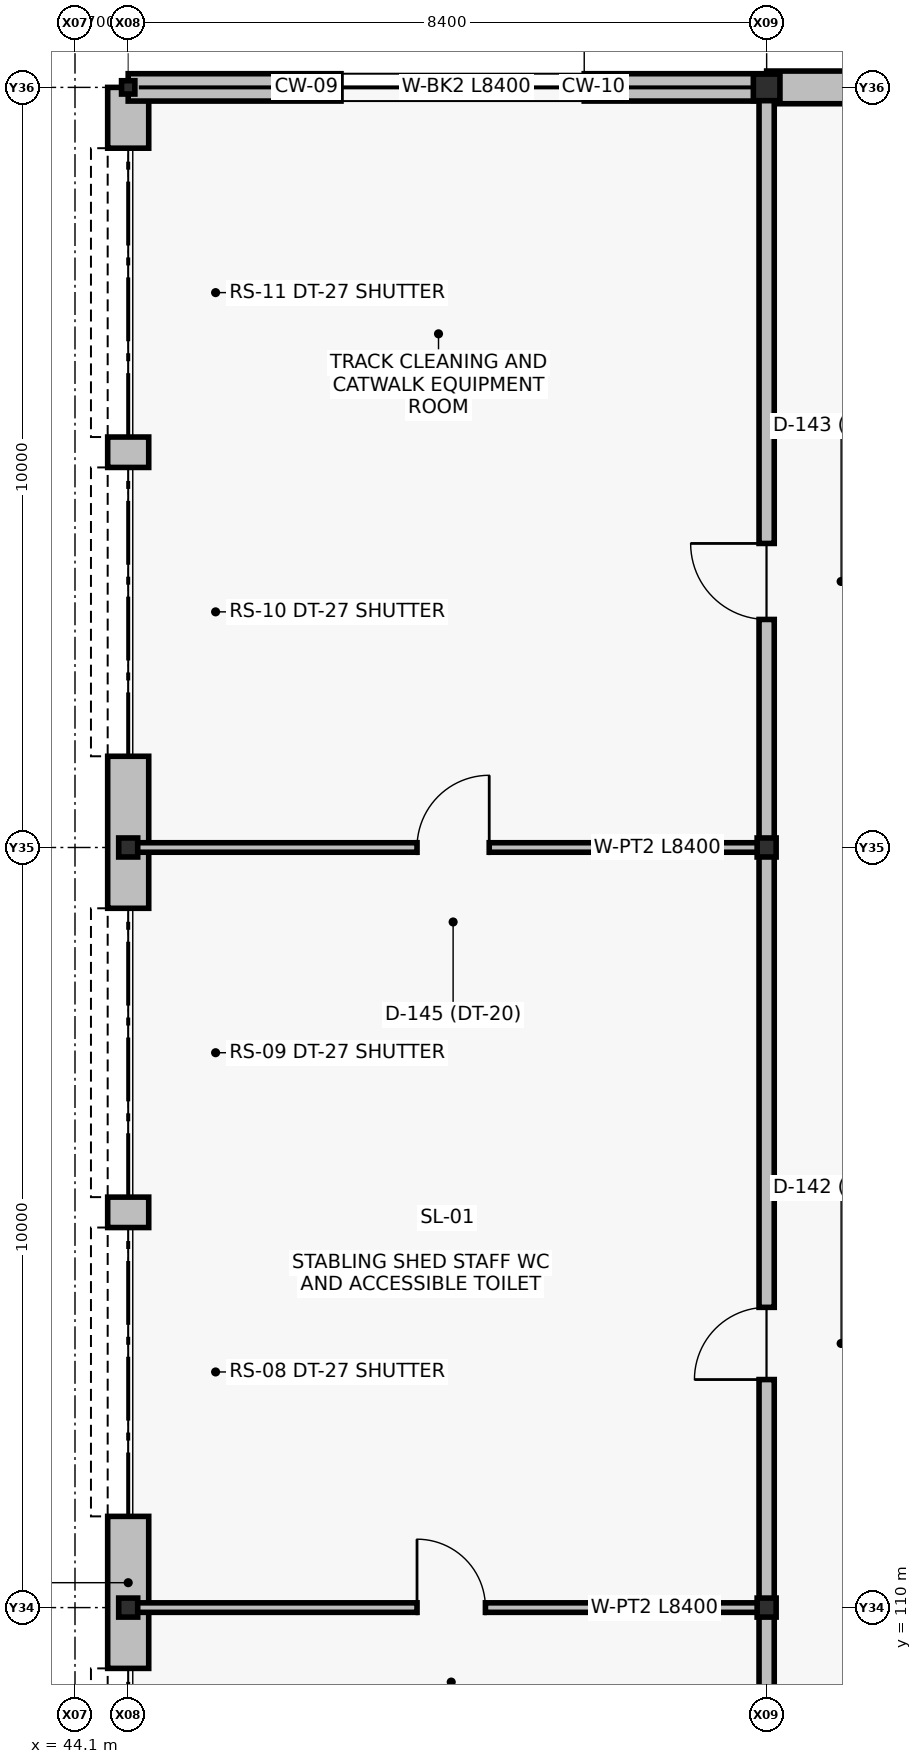
"""IFC4 building model, lengths in metres.
Left out: names, types, materials, properties, quantities, classifications, styles, units other than length and angle.
Written with IfcOpenShell. Run it as: python <this file> out.ifc"""

import sys

from ifc_helpers import new_model, si_unit, direction, frame, frame_2d, origin, origin_2d, place, context, subcontext, project, spatial, rectangle, i_section, extrude, element, fill, save


model = new_model("IFC4")
c1 = context("Model", 3, precision=1e-05, world=origin(), true_north=direction((0.0, 1.0)))
c2 = subcontext(c1, "Body", "Model", "MODEL_VIEW")
j1 = project(units=[si_unit("LENGTHUNIT", "METRE"), si_unit("PLANEANGLEUNIT", "RADIAN")], contexts=[c1])
p1 = place(None, origin())
s1 = spatial("IfcSite", under=j1, at=p1, CompositionType="ELEMENT")
p2 = place(p1, origin())
s2 = spatial("IfcBuilding", under=s1, at=p2, CompositionType="ELEMENT")
p3 = place(p2, origin())
s3 = spatial("IfcBuildingStorey", under=s2, at=p3, CompositionType="ELEMENT", Elevation=0.0)
p4 = place(p3, frame((44.8, 130.0, -0.35), z_axis=(0.0, 0.0, 1.0), x_axis=(1.0, 0.0, 0.0)))
e1 = element("IfcColumn", 1, at=p4, inside=s3, PredefinedType="COLUMN", context=c2, shape_type="SweptSolid", body=[
    extrude(i_section(OverallWidth=0.175, OverallDepth=0.175, WebThickness=0.007, FlangeThickness=0.011, at=origin_2d()), origin(), (0.0, 0.0, 1.0), 6.35),
])
p5 = place(p3, frame((53.2, 130.0, -0.35), z_axis=(0.0, 0.0, 1.0), x_axis=(1.0, 0.0, 0.0)))
e2 = element("IfcColumn", 2, at=p5, inside=s3, PredefinedType="COLUMN", context=c2, shape_type="SweptSolid", body=[
    extrude(i_section(OverallWidth=0.35, OverallDepth=0.35, WebThickness=0.012, FlangeThickness=0.019, at=origin_2d()), origin(), (0.0, 0.0, 1.0), 6.35),
])
for number, where, z_axis, x_axis in (
    (3, (44.8, 110.0, -0.35), (0.0, 0.0, 1.0), (1.0, 0.0, 0.0)),
    (4, (53.2, 110.0, -0.35), (0.0, 0.0, 1.0), (1.0, 0.0, 0.0)),
    (5, (44.8, 120.0, -0.35), (0.0, 0.0, 1.0), (1.0, 0.0, 0.0)),
    (6, (53.2, 120.0, -0.35), (0.0, 0.0, 1.0), (1.0, 0.0, 0.0)),
):
    element("IfcColumn", number, at=place(p3, frame(where, z_axis=z_axis, x_axis=x_axis)), inside=s3, PredefinedType="COLUMN", context=c2, shape_type="SweptSolid", body=[
        extrude(i_section(OverallWidth=0.25, OverallDepth=0.25, WebThickness=0.009, FlangeThickness=0.014, at=origin_2d()), origin(), (0.0, 0.0, 1.0), 6.35),
    ])
p6 = place(p3, frame((44.8, 100.0, 0.0), z_axis=(0.0, 0.0, 1.0), x_axis=(0.0, 1.0, 0.0)))
e7 = element("IfcWall", 7, at=p6, inside=s3, PredefinedType="SOLIDWALL", context=c2, shape_type="SweptSolid", body=[
    extrude(rectangle(XDim=30.0, YDim=0.54, at=frame_2d((15.0, 0.0))), origin(), (0.0, 0.0, 1.0), 5.14),
])
p7 = place(p6, frame((1.2, 0.0, 0.0)))
e8 = element("IfcOpeningElement", 8, at=p7, cuts=e7, PredefinedType="OPENING", context=c2, shape_type="SweptSolid", body=[
    extrude(rectangle(XDim=3.8, YDim=4.4, at=frame_2d((1.9, 2.2))), frame((0.0, 0.28, 0.0), z_axis=(0.0, -1.0, 0.0), x_axis=(1.0, 0.0, 0.0)), (0.0, 0.0, 1.0), 0.56),
])
p8 = place(p6, frame((5.4, 0.0, 0.0)))
e9 = element("IfcOpeningElement", 9, at=p8, cuts=e7, PredefinedType="OPENING", context=c2, shape_type="SweptSolid", body=[
    extrude(rectangle(XDim=3.8, YDim=4.4, at=frame_2d((1.9, 2.2))), frame((0.0, 0.28, 0.0), z_axis=(0.0, -1.0, 0.0), x_axis=(1.0, 0.0, 0.0)), (0.0, 0.0, 1.0), 0.56),
])
p9 = place(p6, frame((11.2, 0.0, 0.0)))
e10 = element("IfcOpeningElement", 10, at=p9, cuts=e7, PredefinedType="OPENING", context=c2, shape_type="SweptSolid", body=[
    extrude(rectangle(XDim=3.8, YDim=4.4, at=frame_2d((1.9, 2.2))), frame((0.0, 0.28, 0.0), z_axis=(0.0, -1.0, 0.0), x_axis=(1.0, 0.0, 0.0)), (0.0, 0.0, 1.0), 0.56),
])
p10 = place(p6, frame((15.4, 0.0, 0.0)))
e11 = element("IfcOpeningElement", 11, at=p10, cuts=e7, PredefinedType="OPENING", context=c2, shape_type="SweptSolid", body=[
    extrude(rectangle(XDim=3.8, YDim=4.4, at=frame_2d((1.9, 2.2))), frame((0.0, 0.28, 0.0), z_axis=(0.0, -1.0, 0.0), x_axis=(1.0, 0.0, 0.0)), (0.0, 0.0, 1.0), 0.56),
])
p11 = place(p6, frame((21.2, 0.0, 0.0)))
e12 = element("IfcOpeningElement", 12, at=p11, cuts=e7, PredefinedType="OPENING", context=c2, shape_type="SweptSolid", body=[
    extrude(rectangle(XDim=3.8, YDim=4.4, at=frame_2d((1.9, 2.2))), frame((0.0, 0.28, 0.0), z_axis=(0.0, -1.0, 0.0), x_axis=(1.0, 0.0, 0.0)), (0.0, 0.0, 1.0), 0.56),
])
p12 = place(p6, frame((25.4, 0.0, 0.0)))
e13 = element("IfcOpeningElement", 13, at=p12, cuts=e7, PredefinedType="OPENING", context=c2, shape_type="SweptSolid", body=[
    extrude(rectangle(XDim=3.8, YDim=4.4, at=frame_2d((1.9, 2.2))), frame((0.0, 0.28, 0.0), z_axis=(0.0, -1.0, 0.0), x_axis=(1.0, 0.0, 0.0)), (0.0, 0.0, 1.0), 0.56),
])
p13 = place(p3, frame((44.8, 130.0, 0.0), z_axis=(0.0, 0.0, 1.0), x_axis=(1.0, 0.0, 0.0)))
e14 = element("IfcWall", 14, at=p13, inside=s3, PredefinedType="SOLIDWALL", context=c2, shape_type="SweptSolid", body=[
    extrude(rectangle(XDim=8.4, YDim=0.36, at=frame_2d((4.2, 0.0))), origin(), (0.0, 0.0, 1.0), 3.2),
])
p14 = place(p13, frame((2.8, 0.0, 0.9)))
e15 = element("IfcOpeningElement", 15, at=p14, cuts=e14, PredefinedType="OPENING", context=c2, shape_type="SweptSolid", body=[
    extrude(rectangle(XDim=3.2, YDim=2.0, at=frame_2d((1.6, 1.0))), frame((0.0, 0.19, 0.0), z_axis=(0.0, -1.0, 0.0), x_axis=(1.0, 0.0, 0.0)), (0.0, 0.0, 1.0), 0.38),
])
p15 = place(p3, frame((53.2, 130.0, 0.0), z_axis=(0.0, 0.0, 1.0), x_axis=(1.0, 0.0, 0.0)))
e16 = element("IfcWall", 16, at=p15, inside=s3, PredefinedType="SOLIDWALL", context=c2, shape_type="SweptSolid", body=[
    extrude(rectangle(XDim=8.4, YDim=0.43, at=frame_2d((4.2, 0.0))), origin(), (0.0, 0.0, 1.0), 5.14),
])
p16 = place(p3, frame((53.2, 77.0, 0.0), z_axis=(0.0, 0.0, 1.0), x_axis=(0.0, 1.0, 0.0)))
e17 = element("IfcWall", 17, at=p16, inside=s3, PredefinedType="PARTITIONING", context=c2, shape_type="SweptSolid", body=[
    extrude(rectangle(XDim=53.0, YDim=0.2, at=frame_2d((26.5, 0.0))), origin(), (0.0, 0.0, 1.0), 5.1),
])
p17 = place(p16, frame((7.0, 0.0, 0.0)))
e18 = element("IfcOpeningElement", 18, at=p17, cuts=e17, PredefinedType="OPENING", context=c2, shape_type="SweptSolid", body=[
    extrude(rectangle(XDim=1.4, YDim=2.2, at=frame_2d((0.7, 1.1))), frame((0.0, 0.11, 0.0), z_axis=(0.0, -1.0, 0.0), x_axis=(1.0, 0.0, 0.0)), (0.0, 0.0, 1.0), 0.22),
])
p18 = place(p16, frame((36.0, 0.0, 0.0)))
e19 = element("IfcOpeningElement", 19, at=p18, cuts=e17, PredefinedType="OPENING", context=c2, shape_type="SweptSolid", body=[
    extrude(rectangle(XDim=0.95, YDim=2.1, at=frame_2d((0.475, 1.05))), frame((0.0, 0.11, 0.0), z_axis=(0.0, -1.0, 0.0), x_axis=(1.0, 0.0, 0.0)), (0.0, 0.0, 1.0), 0.22),
])
p19 = place(p16, frame((46.0, 0.0, 0.0)))
e20 = element("IfcOpeningElement", 20, at=p19, cuts=e17, PredefinedType="OPENING", context=c2, shape_type="SweptSolid", body=[
    extrude(rectangle(XDim=1.0, YDim=2.1, at=frame_2d((0.5, 1.05))), frame((0.0, 0.11, 0.0), z_axis=(0.0, -1.0, 0.0), x_axis=(1.0, 0.0, 0.0)), (0.0, 0.0, 1.0), 0.22),
])
p20 = place(p3, frame((44.8, 110.0, 0.0), z_axis=(0.0, 0.0, 1.0), x_axis=(1.0, 0.0, 0.0)))
e21 = element("IfcWall", 21, at=p20, inside=s3, PredefinedType="PARTITIONING", context=c2, shape_type="SweptSolid", body=[
    extrude(rectangle(XDim=8.4, YDim=0.125, at=frame_2d((4.2, 0.0))), origin(), (0.0, 0.0, 1.0), 5.1),
])
p21 = place(p20, frame((3.8, 0.0, 0.0)))
e22 = element("IfcOpeningElement", 22, at=p21, cuts=e21, PredefinedType="OPENING", context=c2, shape_type="SweptSolid", body=[
    extrude(rectangle(XDim=0.9, YDim=2.1, at=frame_2d((0.45, 1.05))), frame((0.0, 0.072, 0.0), z_axis=(0.0, -1.0, 0.0), x_axis=(1.0, 0.0, 0.0)), (0.0, 0.0, 1.0), 0.145),
])
p22 = place(p3, frame((44.8, 120.0, 0.0), z_axis=(0.0, 0.0, 1.0), x_axis=(1.0, 0.0, 0.0)))
e23 = element("IfcWall", 23, at=p22, inside=s3, PredefinedType="PARTITIONING", context=c2, shape_type="SweptSolid", body=[
    extrude(rectangle(XDim=8.4, YDim=0.125, at=frame_2d((4.2, 0.0))), origin(), (0.0, 0.0, 1.0), 5.1),
])
p23 = place(p22, frame((3.8, 0.0, 0.0)))
e24 = element("IfcOpeningElement", 24, at=p23, cuts=e23, PredefinedType="OPENING", context=c2, shape_type="SweptSolid", body=[
    extrude(rectangle(XDim=0.95, YDim=2.2, at=frame_2d((0.475, 1.1))), frame((0.0, 0.072, 0.0), z_axis=(0.0, -1.0, 0.0), x_axis=(1.0, 0.0, 0.0)), (0.0, 0.0, 1.0), 0.145),
])
p24 = place(p8, origin())
e25 = element("IfcDoor", 25, at=p24, inside=s3, OperationType="ROLLINGUP", PredefinedType="DOOR", context=c2, shape_type="SweptSolid", body=[
    extrude(rectangle(XDim=3.8, YDim=4.4, at=frame_2d((1.9, 2.2))), frame((0.0, 0.025, 0.0), z_axis=(0.0, -1.0, 0.0), x_axis=(1.0, 0.0, 0.0)), (0.0, 0.0, 1.0), 0.05),
])
fill(e9, e25)
p25 = place(p9, origin())
e26 = element("IfcDoor", 26, at=p25, inside=s3, OperationType="ROLLINGUP", PredefinedType="DOOR", context=c2, shape_type="SweptSolid", body=[
    extrude(rectangle(XDim=3.8, YDim=4.4, at=frame_2d((1.9, 2.2))), frame((0.0, 0.025, 0.0), z_axis=(0.0, -1.0, 0.0), x_axis=(1.0, 0.0, 0.0)), (0.0, 0.0, 1.0), 0.05),
])
fill(e10, e26)
p26 = place(p10, origin())
e27 = element("IfcDoor", 27, at=p26, inside=s3, OperationType="ROLLINGUP", PredefinedType="DOOR", context=c2, shape_type="SweptSolid", body=[
    extrude(rectangle(XDim=3.8, YDim=4.4, at=frame_2d((1.9, 2.2))), frame((0.0, 0.025, 0.0), z_axis=(0.0, -1.0, 0.0), x_axis=(1.0, 0.0, 0.0)), (0.0, 0.0, 1.0), 0.05),
])
fill(e11, e27)
p27 = place(p11, origin())
e28 = element("IfcDoor", 28, at=p27, inside=s3, OperationType="ROLLINGUP", PredefinedType="DOOR", context=c2, shape_type="SweptSolid", body=[
    extrude(rectangle(XDim=3.8, YDim=4.4, at=frame_2d((1.9, 2.2))), frame((0.0, 0.025, 0.0), z_axis=(0.0, -1.0, 0.0), x_axis=(1.0, 0.0, 0.0)), (0.0, 0.0, 1.0), 0.05),
])
fill(e12, e28)
p28 = place(p12, origin())
e29 = element("IfcDoor", 29, at=p28, inside=s3, OperationType="ROLLINGUP", PredefinedType="DOOR", context=c2, shape_type="SweptSolid", body=[
    extrude(rectangle(XDim=3.8, YDim=4.4, at=frame_2d((1.9, 2.2))), frame((0.0, 0.025, 0.0), z_axis=(0.0, -1.0, 0.0), x_axis=(1.0, 0.0, 0.0)), (0.0, 0.0, 1.0), 0.05),
])
fill(e13, e29)
p29 = place(p14, origin())
e30 = element("IfcWindow", 30, at=p29, inside=s3, PartitioningType="SINGLE_PANEL", PredefinedType="WINDOW", context=c2, shape_type="SweptSolid", body=[
    extrude(rectangle(XDim=3.2, YDim=2.0, at=frame_2d((1.6, 1.0))), frame((0.0, 0.03, 0.0), z_axis=(0.0, -1.0, 0.0), x_axis=(1.0, 0.0, 0.0)), (0.0, 0.0, 1.0), 0.06),
])
fill(e15, e30)
p30 = place(p18, origin())
e31 = element("IfcDoor", 31, at=p30, inside=s3, OperationType="SINGLE_SWING_LEFT", PredefinedType="DOOR", context=c2, shape_type="SweptSolid", body=[
    extrude(rectangle(XDim=0.95, YDim=2.1, at=frame_2d((0.475, 1.05))), frame((0.0, 0.025, 0.0), z_axis=(0.0, -1.0, 0.0), x_axis=(1.0, 0.0, 0.0)), (0.0, 0.0, 1.0), 0.05),
])
fill(e19, e31)
p31 = place(p19, origin())
e32 = element("IfcDoor", 32, at=p31, inside=s3, OperationType="SINGLE_SWING_RIGHT", PredefinedType="DOOR", context=c2, shape_type="SweptSolid", body=[
    extrude(rectangle(XDim=1.0, YDim=2.1, at=frame_2d((0.5, 1.05))), frame((0.0, 0.025, 0.0), z_axis=(0.0, -1.0, 0.0), x_axis=(1.0, 0.0, 0.0)), (0.0, 0.0, 1.0), 0.05),
])
fill(e20, e32)
p32 = place(p21, origin())
e33 = element("IfcDoor", 33, at=p32, inside=s3, OperationType="SINGLE_SWING_LEFT", PredefinedType="DOOR", context=c2, shape_type="SweptSolid", body=[
    extrude(rectangle(XDim=0.9, YDim=2.1, at=frame_2d((0.45, 1.05))), frame((0.0, 0.025, 0.0), z_axis=(0.0, -1.0, 0.0), x_axis=(1.0, 0.0, 0.0)), (0.0, 0.0, 1.0), 0.05),
])
fill(e22, e33)
p33 = place(p23, origin())
e34 = element("IfcDoor", 34, at=p33, inside=s3, OperationType="SINGLE_SWING_RIGHT", PredefinedType="DOOR", context=c2, shape_type="SweptSolid", body=[
    extrude(rectangle(XDim=0.95, YDim=2.2, at=frame_2d((0.475, 1.1))), frame((0.0, 0.025, 0.0), z_axis=(0.0, -1.0, 0.0), x_axis=(1.0, 0.0, 0.0)), (0.0, 0.0, 1.0), 0.05),
])
fill(e24, e34)
save(model, sys.argv[1])
